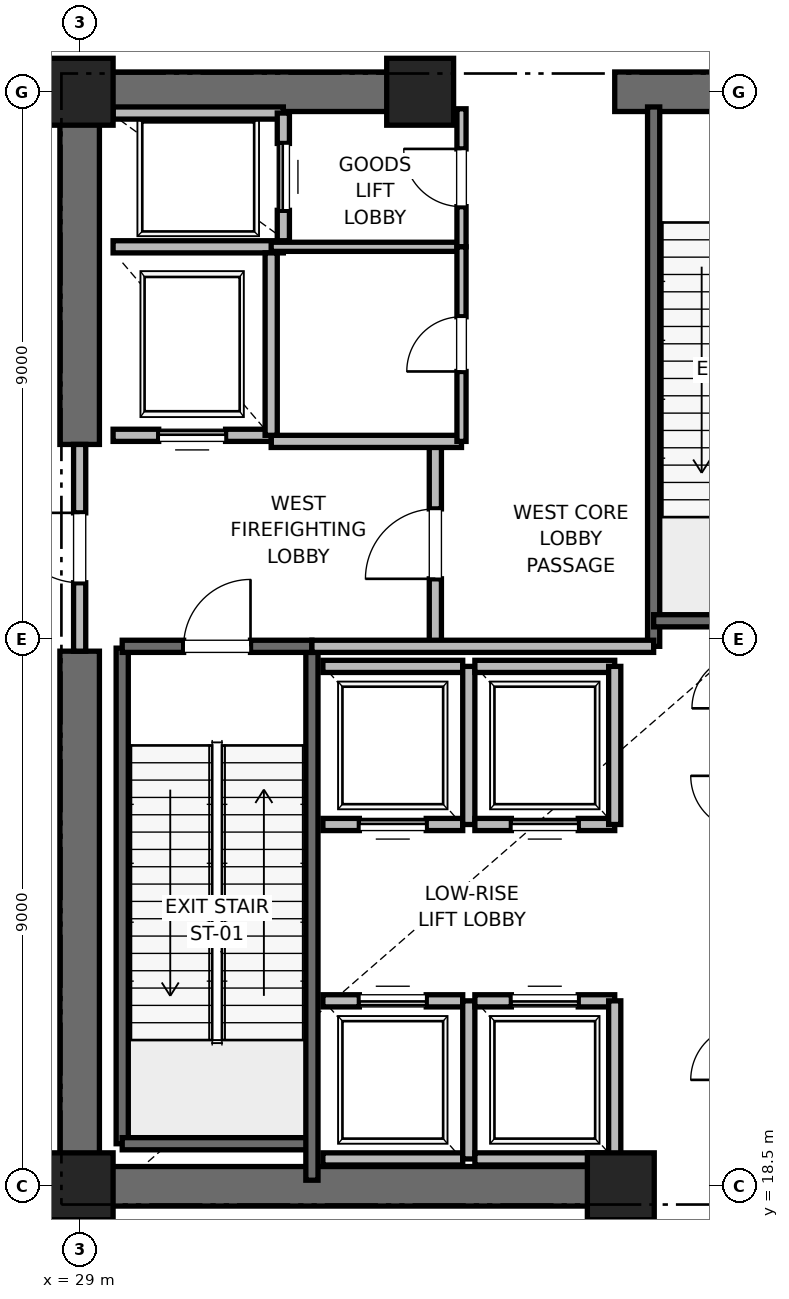
"""IFC4 building model, lengths in metres.
Left out: names, types, materials, properties, quantities, classifications, styles, units other than length and angle.
Written with IfcOpenShell. Run it as: python <this file> out.ifc"""

import sys

from ifc_helpers import new_model, si_unit, direction, frame, frame_2d, origin, origin_2d, place, context, subcontext, project, spatial, rectangle, extrude, element, fill, save


model = new_model("IFC4")
c1 = context("Model", 3, precision=1e-05, world=origin(), true_north=direction((0.0, 1.0)))
c2 = subcontext(c1, "Body", "Model", "MODEL_VIEW")
j1 = project(units=[si_unit("LENGTHUNIT", "METRE"), si_unit("PLANEANGLEUNIT", "RADIAN")], contexts=[c1])
p1 = place(None, origin())
s1 = spatial("IfcSite", under=j1, at=p1, CompositionType="ELEMENT")
p2 = place(p1, origin())
s2 = spatial("IfcBuilding", under=s1, at=p2, CompositionType="ELEMENT")
p3 = place(p2, frame((0.0, 0.0, 21.6)))
s3 = spatial("IfcBuildingStorey", under=s2, at=p3, CompositionType="ELEMENT", Elevation=21.6)
for number, where, z_axis, x_axis in (
    (1, (29.0, 18.5, 0.0), (0.0, 0.0, 1.0), (1.0, 0.0, 0.0)),
    (2, (29.0, 36.5, 0.0), (0.0, 0.0, 1.0), (1.0, 0.0, 0.0)),
    (3, (37.9, 18.5, 0.0), (0.0, 0.0, 1.0), (1.0, 0.0, 0.0)),
    (4, (34.6, 36.5, 0.0), (0.0, 0.0, 1.0), (1.0, 0.0, 0.0)),
):
    element("IfcColumn", number, at=place(p3, frame(where, z_axis=z_axis, x_axis=x_axis)), inside=s3, PredefinedType="PILASTER", context=c2, shape_type="SweptSolid", body=[
        extrude(rectangle(XDim=1.1, YDim=1.1, at=origin_2d()), origin(), (0.0, 0.0, 1.0), 6.0),
    ])
p4 = place(p3, frame((29.0, 18.5, 0.0), z_axis=(0.0, 0.0, 1.0), x_axis=(1.0, 0.0, 0.0)))
e5 = element("IfcWall", 5, at=p4, inside=s3, PredefinedType="SHEAR", context=c2, shape_type="SweptSolid", body=[
    extrude(rectangle(XDim=9.2, YDim=0.65, at=frame_2d((4.6, 0.0))), origin(), (0.0, 0.0, 1.0), 5.76),
])
p5 = place(p3, frame((29.0, 36.5, 0.0), z_axis=(0.0, 0.0, 1.0), x_axis=(1.0, 0.0, 0.0)))
e6 = element("IfcWall", 6, at=p5, inside=s3, PredefinedType="SHEAR", context=c2, shape_type="SweptSolid", body=[
    extrude(rectangle(XDim=5.8, YDim=0.65, at=frame_2d((2.9, 0.0))), origin(), (0.0, 0.0, 1.0), 5.76),
])
p6 = place(p3, frame((37.8, 36.5, 0.0), z_axis=(0.0, 0.0, 1.0), x_axis=(1.0, 0.0, 0.0)))
e7 = element("IfcWall", 7, at=p6, inside=s3, PredefinedType="SHEAR", context=c2, shape_type="SweptSolid", body=[
    extrude(rectangle(XDim=4.4, YDim=0.65, at=frame_2d((2.2, 0.0))), origin(), (0.0, 0.0, 1.0), 5.76),
])
p7 = place(p6, frame((1.65, 0.0, 0.0)))
e8 = element("IfcOpeningElement", 8, at=p7, cuts=e7, PredefinedType="OPENING", context=c2, shape_type="SweptSolid", body=[
    extrude(rectangle(XDim=1.1, YDim=2.15, at=frame_2d((0.55, 1.075))), frame((0.0, 0.325, 0.0), z_axis=(0.0, -1.0, 0.0), x_axis=(1.0, 0.0, 0.0)), (0.0, 0.0, 1.0), 0.65),
])
p8 = place(p3, frame((29.0, 18.5, 0.0), z_axis=(0.0, 0.0, 1.0), x_axis=(0.0, 1.0, 0.0)))
e9 = element("IfcWall", 9, at=p8, inside=s3, PredefinedType="SHEAR", context=c2, shape_type="SweptSolid", body=[
    extrude(rectangle(XDim=8.8, YDim=0.65, at=frame_2d((4.4, 0.0))), origin(), (0.0, 0.0, 1.0), 5.76),
])
p9 = place(p3, frame((29.0, 30.7, 0.0), z_axis=(0.0, 0.0, 1.0), x_axis=(0.0, 1.0, 0.0)))
e10 = element("IfcWall", 10, at=p9, inside=s3, PredefinedType="SHEAR", context=c2, shape_type="SweptSolid", body=[
    extrude(rectangle(XDim=5.8, YDim=0.65, at=frame_2d((2.9, 0.0))), origin(), (0.0, 0.0, 1.0), 5.76),
])
p10 = place(p3, frame((29.7, 19.2, 0.0), z_axis=(0.0, 0.0, 1.0), x_axis=(0.0, 1.0, 0.0)))
e11 = element("IfcWall", 11, at=p10, inside=s3, PredefinedType="SOLIDWALL", context=c2, shape_type="SweptSolid", body=[
    extrude(rectangle(XDim=8.15, YDim=0.2, at=frame_2d((4.075, 0.0))), origin(), (0.0, 0.0, 1.0), 5.76),
])
p11 = place(p3, frame((29.7, 19.2, 0.0), z_axis=(0.0, 0.0, 1.0), x_axis=(1.0, 0.0, 0.0)))
e12 = element("IfcWall", 12, at=p11, inside=s3, PredefinedType="SOLIDWALL", context=c2, shape_type="SweptSolid", body=[
    extrude(rectangle(XDim=3.12, YDim=0.2, at=frame_2d((1.56, 0.0))), origin(), (0.0, 0.0, 1.0), 5.76),
])
p12 = place(p3, frame((32.82, 18.6, 0.0), z_axis=(0.0, 0.0, 1.0), x_axis=(0.0, 1.0, 0.0)))
e13 = element("IfcWall", 13, at=p12, inside=s3, PredefinedType="SOLIDWALL", context=c2, shape_type="SweptSolid", body=[
    extrude(rectangle(XDim=8.78, YDim=0.2, at=frame_2d((4.39, 0.0))), origin(), (0.0, 0.0, 1.0), 5.76),
])
p13 = place(p3, frame((29.7, 27.38, 0.0), z_axis=(0.0, 0.0, 1.0), x_axis=(1.0, 0.0, 0.0)))
e14 = element("IfcWall", 14, at=p13, inside=s3, PredefinedType="SOLIDWALL", context=c2, shape_type="SweptSolid", body=[
    extrude(rectangle(XDim=3.12, YDim=0.2, at=frame_2d((1.56, 0.0))), origin(), (0.0, 0.0, 1.0), 5.76),
])
p14 = place(p13, frame((1.01, 0.0, 0.0)))
e15 = element("IfcOpeningElement", 15, at=p14, cuts=e14, PredefinedType="OPENING", context=c2, shape_type="SweptSolid", body=[
    extrude(rectangle(XDim=1.1, YDim=2.15, at=frame_2d((0.55, 1.075))), frame((0.0, 0.1, 0.0), z_axis=(0.0, -1.0, 0.0), x_axis=(1.0, 0.0, 0.0)), (0.0, 0.0, 1.0), 0.2),
])
p15 = place(p3, frame((38.44, 27.38, 0.0), z_axis=(0.0, 0.0, 1.0), x_axis=(0.0, 1.0, 0.0)))
e16 = element("IfcWall", 16, at=p15, inside=s3, PredefinedType="SOLIDWALL", context=c2, shape_type="SweptSolid", body=[
    extrude(rectangle(XDim=8.87, YDim=0.2, at=frame_2d((4.435, 0.0))), origin(), (0.0, 0.0, 1.0), 5.76),
])
p16 = place(p3, frame((38.44, 27.8, 0.0), z_axis=(0.0, 0.0, 1.0), x_axis=(1.0, 0.0, 0.0)))
e17 = element("IfcWall", 17, at=p16, inside=s3, PredefinedType="SOLIDWALL", context=c2, shape_type="SweptSolid", body=[
    extrude(rectangle(XDim=3.32, YDim=0.2, at=frame_2d((1.66, 0.0))), origin(), (0.0, 0.0, 1.0), 5.76),
])
p17 = place(p3, frame((34.85, 27.38, 0.0), z_axis=(0.0, 0.0, 1.0), x_axis=(0.0, 1.0, 0.0)))
e18 = element("IfcWall", 18, at=p17, inside=s3, PredefinedType="PARTITIONING", context=c2, shape_type="SweptSolid", body=[
    extrude(rectangle(XDim=3.37, YDim=0.2, at=frame_2d((1.685, 0.0))), origin(), (0.0, 0.0, 1.0), 5.76),
])
p18 = place(p17, frame((1.11, 0.0, 0.0)))
e19 = element("IfcOpeningElement", 19, at=p18, cuts=e18, PredefinedType="OPENING", context=c2, shape_type="SweptSolid", body=[
    extrude(rectangle(XDim=1.15, YDim=2.2, at=frame_2d((0.575, 1.1))), frame((0.0, 0.1, 0.0), z_axis=(0.0, -1.0, 0.0), x_axis=(1.0, 0.0, 0.0)), (0.0, 0.0, 1.0), 0.2),
])
p19 = place(p3, frame((29.0, 27.3, 0.0), z_axis=(0.0, 0.0, 1.0), x_axis=(0.0, 1.0, 0.0)))
e20 = element("IfcWall", 20, at=p19, inside=s3, PredefinedType="PARTITIONING", context=c2, shape_type="SweptSolid", body=[
    extrude(rectangle(XDim=3.4, YDim=0.2, at=frame_2d((1.7, 0.0))), origin(), (0.0, 0.0, 1.0), 4.54),
])
p20 = place(p19, frame((1.125, 0.0, 0.0)))
e21 = element("IfcOpeningElement", 21, at=p20, cuts=e20, PredefinedType="OPENING", context=c2, shape_type="SweptSolid", body=[
    extrude(rectangle(XDim=1.15, YDim=2.2, at=frame_2d((0.575, 1.1))), frame((0.0, 0.1, 0.0), z_axis=(0.0, -1.0, 0.0), x_axis=(1.0, 0.0, 0.0)), (0.0, 0.0, 1.0), 0.2),
])
p21 = place(p3, frame((32.82, 27.38, 0.0), z_axis=(0.0, 0.0, 1.0), x_axis=(1.0, 0.0, 0.0)))
e22 = element("IfcWall", 22, at=p21, inside=s3, PredefinedType="PARTITIONING", context=c2, shape_type="SweptSolid", body=[
    extrude(rectangle(XDim=5.62, YDim=0.2, at=frame_2d((2.81, 0.0))), origin(), (0.0, 0.0, 1.0), 5.76),
])
p22 = place(p3, frame((32.15, 30.75, 0.0), z_axis=(0.0, 0.0, 1.0), x_axis=(1.0, 0.0, 0.0)))
e23 = element("IfcWall", 23, at=p22, inside=s3, PredefinedType="PARTITIONING", context=c2, shape_type="SweptSolid", body=[
    extrude(rectangle(XDim=3.13, YDim=0.2, at=frame_2d((1.565, 0.0))), origin(), (0.0, 0.0, 1.0), 5.76),
])
p23 = place(p3, frame((29.55, 30.85, 0.0), z_axis=(0.0, 0.0, 1.0), x_axis=(1.0, 0.0, 0.0)))
e24 = element("IfcWall", 24, at=p23, inside=s3, PredefinedType="SOLIDWALL", context=c2, shape_type="SweptSolid", body=[
    extrude(rectangle(XDim=2.6, YDim=0.2, at=frame_2d((1.3, 0.0))), origin(), (0.0, 0.0, 1.0), 4.54),
])
p24 = place(p23, frame((0.75, 0.0, 0.0)))
e25 = element("IfcOpeningElement", 25, at=p24, cuts=e24, PredefinedType="OPENING", context=c2, shape_type="SweptSolid", body=[
    extrude(rectangle(XDim=1.1, YDim=2.2, at=frame_2d((0.55, 1.1))), frame((0.0, 0.1, 0.0), z_axis=(0.0, -1.0, 0.0), x_axis=(1.0, 0.0, 0.0)), (0.0, 0.0, 1.0), 0.2),
])
p25 = place(p3, frame((29.55, 33.95, 0.0), z_axis=(0.0, 0.0, 1.0), x_axis=(1.0, 0.0, 0.0)))
e26 = element("IfcWall", 26, at=p25, inside=s3, PredefinedType="SOLIDWALL", context=c2, shape_type="SweptSolid", body=[
    extrude(rectangle(XDim=2.8, YDim=0.2, at=frame_2d((1.4, 0.0))), origin(), (0.0, 0.0, 1.0), 5.76),
])
p26 = place(p3, frame((32.15, 30.85, 0.0), z_axis=(0.0, 0.0, 1.0), x_axis=(0.0, 1.0, 0.0)))
e27 = element("IfcWall", 27, at=p26, inside=s3, PredefinedType="SOLIDWALL", context=c2, shape_type="SweptSolid", body=[
    extrude(rectangle(XDim=3.0, YDim=0.2, at=frame_2d((1.5, 0.0))), origin(), (0.0, 0.0, 1.0), 5.76),
])
p27 = place(p3, frame((32.35, 36.15, 0.0), z_axis=(0.0, 0.0, 1.0), x_axis=(-1.0, 0.0, 0.0)))
e28 = element("IfcWall", 28, at=p27, inside=s3, PredefinedType="SOLIDWALL", context=c2, shape_type="SweptSolid", body=[
    extrude(rectangle(XDim=2.8, YDim=0.2, at=frame_2d((1.4, 0.0))), origin(), (0.0, 0.0, 1.0), 4.889),
])
p28 = place(p3, frame((32.35, 34.05, 0.0), z_axis=(0.0, 0.0, 1.0), x_axis=(0.0, 1.0, 0.0)))
e29 = element("IfcWall", 29, at=p28, inside=s3, PredefinedType="SOLIDWALL", context=c2, shape_type="SweptSolid", body=[
    extrude(rectangle(XDim=2.1, YDim=0.2, at=frame_2d((1.05, 0.0))), origin(), (0.0, 0.0, 1.0), 5.76),
])
p29 = place(p28, frame((0.5, 0.0, 0.0)))
e30 = element("IfcOpeningElement", 30, at=p29, cuts=e29, PredefinedType="OPENING", context=c2, shape_type="SweptSolid", body=[
    extrude(rectangle(XDim=1.1, YDim=2.2, at=frame_2d((0.55, 1.1))), frame((0.0, 0.1, 0.0), z_axis=(0.0, -1.0, 0.0), x_axis=(1.0, 0.0, 0.0)), (0.0, 0.0, 1.0), 0.2),
])
p30 = place(p3, frame((33.0, 18.95, 0.0), z_axis=(0.0, 0.0, 1.0), x_axis=(1.0, 0.0, 0.0)))
e31 = element("IfcWall", 31, at=p30, inside=s3, PredefinedType="SOLIDWALL", context=c2, shape_type="SweptSolid", body=[
    extrude(rectangle(XDim=2.3, YDim=0.2, at=frame_2d((1.15, 0.0))), origin(), (0.0, 0.0, 1.0), 5.76),
])
p31 = place(p3, frame((35.3, 21.55, 0.0), z_axis=(0.0, 0.0, 1.0), x_axis=(-1.0, 0.0, 0.0)))
e32 = element("IfcWall", 32, at=p31, inside=s3, PredefinedType="SOLIDWALL", context=c2, shape_type="SweptSolid", body=[
    extrude(rectangle(XDim=2.3, YDim=0.2, at=frame_2d((1.15, 0.0))), origin(), (0.0, 0.0, 1.0), 5.76),
])
p32 = place(p31, frame((0.6, 0.0, 0.0)))
e33 = element("IfcOpeningElement", 33, at=p32, cuts=e32, PredefinedType="OPENING", context=c2, shape_type="SweptSolid", body=[
    extrude(rectangle(XDim=1.1, YDim=2.2, at=frame_2d((0.55, 1.1))), frame((0.0, 0.1, 0.0), z_axis=(0.0, -1.0, 0.0), x_axis=(1.0, 0.0, 0.0)), (0.0, 0.0, 1.0), 0.2),
])
p33 = place(p3, frame((35.4, 18.95, 0.0), z_axis=(0.0, 0.0, 1.0), x_axis=(0.0, 1.0, 0.0)))
e34 = element("IfcWall", 34, at=p33, inside=s3, PredefinedType="SOLIDWALL", context=c2, shape_type="SweptSolid", body=[
    extrude(rectangle(XDim=2.6, YDim=0.2, at=frame_2d((1.3, 0.0))), origin(), (0.0, 0.0, 1.0), 5.76),
])
p34 = place(p3, frame((35.5, 18.95, 0.0), z_axis=(0.0, 0.0, 1.0), x_axis=(1.0, 0.0, 0.0)))
e35 = element("IfcWall", 35, at=p34, inside=s3, PredefinedType="SOLIDWALL", context=c2, shape_type="SweptSolid", body=[
    extrude(rectangle(XDim=2.3, YDim=0.2, at=frame_2d((1.15, 0.0))), origin(), (0.0, 0.0, 1.0), 4.54),
])
p35 = place(p3, frame((37.8, 21.55, 0.0), z_axis=(0.0, 0.0, 1.0), x_axis=(-1.0, 0.0, 0.0)))
e36 = element("IfcWall", 36, at=p35, inside=s3, PredefinedType="SOLIDWALL", context=c2, shape_type="SweptSolid", body=[
    extrude(rectangle(XDim=2.3, YDim=0.2, at=frame_2d((1.15, 0.0))), origin(), (0.0, 0.0, 1.0), 5.76),
])
p36 = place(p35, frame((0.6, 0.0, 0.0)))
e37 = element("IfcOpeningElement", 37, at=p36, cuts=e36, PredefinedType="OPENING", context=c2, shape_type="SweptSolid", body=[
    extrude(rectangle(XDim=1.1, YDim=2.2, at=frame_2d((0.55, 1.1))), frame((0.0, 0.1, 0.0), z_axis=(0.0, -1.0, 0.0), x_axis=(1.0, 0.0, 0.0)), (0.0, 0.0, 1.0), 0.2),
])
p37 = place(p3, frame((37.8, 18.95, 0.0), z_axis=(0.0, 0.0, 1.0), x_axis=(0.0, 1.0, 0.0)))
e38 = element("IfcWall", 38, at=p37, inside=s3, PredefinedType="SOLIDWALL", context=c2, shape_type="SweptSolid", body=[
    extrude(rectangle(XDim=2.6, YDim=0.2, at=frame_2d((1.3, 0.0))), origin(), (0.0, 0.0, 1.0), 4.54),
])
p38 = place(p3, frame((33.0, 24.45, 0.0), z_axis=(0.0, 0.0, 1.0), x_axis=(1.0, 0.0, 0.0)))
e39 = element("IfcWall", 39, at=p38, inside=s3, PredefinedType="SOLIDWALL", context=c2, shape_type="SweptSolid", body=[
    extrude(rectangle(XDim=2.3, YDim=0.2, at=frame_2d((1.15, 0.0))), origin(), (0.0, 0.0, 1.0), 5.76),
])
p39 = place(p38, frame((0.6, 0.0, 0.0)))
e40 = element("IfcOpeningElement", 40, at=p39, cuts=e39, PredefinedType="OPENING", context=c2, shape_type="SweptSolid", body=[
    extrude(rectangle(XDim=1.1, YDim=2.2, at=frame_2d((0.55, 1.1))), frame((0.0, 0.1, 0.0), z_axis=(0.0, -1.0, 0.0), x_axis=(1.0, 0.0, 0.0)), (0.0, 0.0, 1.0), 0.2),
])
p40 = place(p3, frame((35.3, 27.05, 0.0), z_axis=(0.0, 0.0, 1.0), x_axis=(-1.0, 0.0, 0.0)))
e41 = element("IfcWall", 41, at=p40, inside=s3, PredefinedType="SOLIDWALL", context=c2, shape_type="SweptSolid", body=[
    extrude(rectangle(XDim=2.3, YDim=0.2, at=frame_2d((1.15, 0.0))), origin(), (0.0, 0.0, 1.0), 5.76),
])
p41 = place(p3, frame((35.4, 24.45, 0.0), z_axis=(0.0, 0.0, 1.0), x_axis=(0.0, 1.0, 0.0)))
e42 = element("IfcWall", 42, at=p41, inside=s3, PredefinedType="SOLIDWALL", context=c2, shape_type="SweptSolid", body=[
    extrude(rectangle(XDim=2.6, YDim=0.2, at=frame_2d((1.3, 0.0))), origin(), (0.0, 0.0, 1.0), 5.76),
])
p42 = place(p3, frame((35.5, 24.45, 0.0), z_axis=(0.0, 0.0, 1.0), x_axis=(1.0, 0.0, 0.0)))
e43 = element("IfcWall", 43, at=p42, inside=s3, PredefinedType="SOLIDWALL", context=c2, shape_type="SweptSolid", body=[
    extrude(rectangle(XDim=2.3, YDim=0.2, at=frame_2d((1.15, 0.0))), origin(), (0.0, 0.0, 1.0), 5.76),
])
p43 = place(p42, frame((0.6, 0.0, 0.0)))
e44 = element("IfcOpeningElement", 44, at=p43, cuts=e43, PredefinedType="OPENING", context=c2, shape_type="SweptSolid", body=[
    extrude(rectangle(XDim=1.1, YDim=2.2, at=frame_2d((0.55, 1.1))), frame((0.0, 0.1, 0.0), z_axis=(0.0, -1.0, 0.0), x_axis=(1.0, 0.0, 0.0)), (0.0, 0.0, 1.0), 0.2),
])
p44 = place(p3, frame((37.8, 27.05, 0.0), z_axis=(0.0, 0.0, 1.0), x_axis=(-1.0, 0.0, 0.0)))
e45 = element("IfcWall", 45, at=p44, inside=s3, PredefinedType="SOLIDWALL", context=c2, shape_type="SweptSolid", body=[
    extrude(rectangle(XDim=2.3, YDim=0.2, at=frame_2d((1.15, 0.0))), origin(), (0.0, 0.0, 1.0), 5.76),
])
p45 = place(p3, frame((37.8, 24.45, 0.0), z_axis=(0.0, 0.0, 1.0), x_axis=(0.0, 1.0, 0.0)))
e46 = element("IfcWall", 46, at=p45, inside=s3, PredefinedType="SOLIDWALL", context=c2, shape_type="SweptSolid", body=[
    extrude(rectangle(XDim=2.6, YDim=0.2, at=frame_2d((1.3, 0.0))), origin(), (0.0, 0.0, 1.0), 5.76),
])
p46 = place(p3, frame((32.15, 33.95, 0.0), z_axis=(0.0, 0.0, 1.0), x_axis=(1.0, 0.0, 0.0)))
e47 = element("IfcWall", 47, at=p46, inside=s3, PredefinedType="PARTITIONING", context=c2, shape_type="SweptSolid", body=[
    extrude(rectangle(XDim=3.13, YDim=0.15, at=frame_2d((1.565, 0.0))), origin(), (0.0, 0.0, 1.0), 2.85),
])
p47 = place(p3, frame((35.28, 33.95, 0.0), z_axis=(0.0, 0.0, 1.0), x_axis=(0.0, 1.0, 0.0)))
e48 = element("IfcWall", 48, at=p47, inside=s3, PredefinedType="PARTITIONING", context=c2, shape_type="SweptSolid", body=[
    extrude(rectangle(XDim=2.27, YDim=0.15, at=frame_2d((1.135, 0.0))), origin(), (0.0, 0.0, 1.0), 2.85),
])
p48 = place(p47, frame((0.66, 0.0, 0.0)))
e49 = element("IfcOpeningElement", 49, at=p48, cuts=e48, PredefinedType="OPENING", context=c2, shape_type="SweptSolid", body=[
    extrude(rectangle(XDim=0.95, YDim=2.15, at=frame_2d((0.475, 1.075))), frame((0.0, 0.075, 0.0), z_axis=(0.0, -1.0, 0.0), x_axis=(1.0, 0.0, 0.0)), (0.0, 0.0, 1.0), 0.15),
])
p49 = place(p3, frame((35.28, 30.75, 0.0), z_axis=(0.0, 0.0, 1.0), x_axis=(0.0, 1.0, 0.0)))
e50 = element("IfcWall", 50, at=p49, inside=s3, PredefinedType="PARTITIONING", context=c2, shape_type="SweptSolid", body=[
    extrude(rectangle(XDim=3.2, YDim=0.15, at=frame_2d((1.6, 0.0))), origin(), (0.0, 0.0, 1.0), 2.85),
])
p50 = place(p49, frame((1.15, 0.0, 0.0)))
e51 = element("IfcOpeningElement", 51, at=p50, cuts=e50, PredefinedType="OPENING", context=c2, shape_type="SweptSolid", body=[
    extrude(rectangle(XDim=0.9, YDim=2.1, at=frame_2d((0.45, 1.05))), frame((0.0, 0.075, 0.0), z_axis=(0.0, -1.0, 0.0), x_axis=(1.0, 0.0, 0.0)), (0.0, 0.0, 1.0), 0.15),
])
p51 = place(p14, origin())
e52 = element("IfcDoor", 52, at=p51, inside=s3, OperationType="SINGLE_SWING_RIGHT", PredefinedType="DOOR", context=c2, shape_type="SweptSolid", body=[
    extrude(rectangle(XDim=1.1, YDim=2.15, at=frame_2d((0.55, 1.075))), frame((0.0, 0.025, 0.0), z_axis=(0.0, -1.0, 0.0), x_axis=(1.0, 0.0, 0.0)), (0.0, 0.0, 1.0), 0.05),
])
fill(e15, e52)
p52 = place(p18, origin())
e53 = element("IfcDoor", 53, at=p52, inside=s3, OperationType="SINGLE_SWING_LEFT", PredefinedType="DOOR", context=c2, shape_type="SweptSolid", body=[
    extrude(rectangle(XDim=1.15, YDim=2.2, at=frame_2d((0.575, 1.1))), frame((0.0, 0.025, 0.0), z_axis=(0.0, -1.0, 0.0), x_axis=(1.0, 0.0, 0.0)), (0.0, 0.0, 1.0), 0.05),
])
fill(e19, e53)
p53 = place(p20, origin())
e54 = element("IfcDoor", 54, at=p53, inside=s3, OperationType="SINGLE_SWING_RIGHT", PredefinedType="DOOR", context=c2, shape_type="SweptSolid", body=[
    extrude(rectangle(XDim=1.15, YDim=2.2, at=frame_2d((0.575, 1.1))), frame((0.0, 0.025, 0.0), z_axis=(0.0, -1.0, 0.0), x_axis=(1.0, 0.0, 0.0)), (0.0, 0.0, 1.0), 0.05),
])
fill(e21, e54)
p54 = place(p24, origin())
e55 = element("IfcDoor", 55, at=p54, inside=s3, OperationType="SLIDING_TO_RIGHT", PredefinedType="DOOR", context=c2, shape_type="SweptSolid", body=[
    extrude(rectangle(XDim=1.1, YDim=2.2, at=frame_2d((0.55, 1.1))), frame((0.0, 0.025, 0.0), z_axis=(0.0, -1.0, 0.0), x_axis=(1.0, 0.0, 0.0)), (0.0, 0.0, 1.0), 0.05),
])
fill(e25, e55)
p55 = place(p29, origin())
e56 = element("IfcDoor", 56, at=p55, inside=s3, OperationType="SLIDING_TO_RIGHT", PredefinedType="DOOR", context=c2, shape_type="SweptSolid", body=[
    extrude(rectangle(XDim=1.1, YDim=2.2, at=frame_2d((0.55, 1.1))), frame((0.0, 0.025, 0.0), z_axis=(0.0, -1.0, 0.0), x_axis=(1.0, 0.0, 0.0)), (0.0, 0.0, 1.0), 0.05),
])
fill(e30, e56)
p56 = place(p32, origin())
e57 = element("IfcDoor", 57, at=p56, inside=s3, OperationType="SLIDING_TO_RIGHT", PredefinedType="DOOR", context=c2, shape_type="SweptSolid", body=[
    extrude(rectangle(XDim=1.1, YDim=2.2, at=frame_2d((0.55, 1.1))), frame((0.0, 0.025, 0.0), z_axis=(0.0, -1.0, 0.0), x_axis=(1.0, 0.0, 0.0)), (0.0, 0.0, 1.0), 0.05),
])
fill(e33, e57)
p57 = place(p36, origin())
e58 = element("IfcDoor", 58, at=p57, inside=s3, OperationType="SLIDING_TO_RIGHT", PredefinedType="DOOR", context=c2, shape_type="SweptSolid", body=[
    extrude(rectangle(XDim=1.1, YDim=2.2, at=frame_2d((0.55, 1.1))), frame((0.0, 0.025, 0.0), z_axis=(0.0, -1.0, 0.0), x_axis=(1.0, 0.0, 0.0)), (0.0, 0.0, 1.0), 0.05),
])
fill(e37, e58)
p58 = place(p39, origin())
e59 = element("IfcDoor", 59, at=p58, inside=s3, OperationType="SLIDING_TO_RIGHT", PredefinedType="DOOR", context=c2, shape_type="SweptSolid", body=[
    extrude(rectangle(XDim=1.1, YDim=2.2, at=frame_2d((0.55, 1.1))), frame((0.0, 0.025, 0.0), z_axis=(0.0, -1.0, 0.0), x_axis=(1.0, 0.0, 0.0)), (0.0, 0.0, 1.0), 0.05),
])
fill(e40, e59)
p59 = place(p43, origin())
e60 = element("IfcDoor", 60, at=p59, inside=s3, OperationType="SLIDING_TO_RIGHT", PredefinedType="DOOR", context=c2, shape_type="SweptSolid", body=[
    extrude(rectangle(XDim=1.1, YDim=2.2, at=frame_2d((0.55, 1.1))), frame((0.0, 0.025, 0.0), z_axis=(0.0, -1.0, 0.0), x_axis=(1.0, 0.0, 0.0)), (0.0, 0.0, 1.0), 0.05),
])
fill(e44, e60)
p60 = place(p48, origin())
e61 = element("IfcDoor", 61, at=p60, inside=s3, OperationType="SINGLE_SWING_RIGHT", PredefinedType="DOOR", context=c2, shape_type="SweptSolid", body=[
    extrude(rectangle(XDim=0.95, YDim=2.15, at=frame_2d((0.475, 1.075))), frame((0.0, 0.025, 0.0), z_axis=(0.0, -1.0, 0.0), x_axis=(1.0, 0.0, 0.0)), (0.0, 0.0, 1.0), 0.05),
])
fill(e49, e61)
p61 = place(p50, origin())
e62 = element("IfcDoor", 62, at=p61, inside=s3, OperationType="SINGLE_SWING_LEFT", PredefinedType="DOOR", context=c2, shape_type="SweptSolid", body=[
    extrude(rectangle(XDim=0.9, YDim=2.1, at=frame_2d((0.45, 1.05))), frame((0.0, 0.025, 0.0), z_axis=(0.0, -1.0, 0.0), x_axis=(1.0, 0.0, 0.0)), (0.0, 0.0, 1.0), 0.05),
])
fill(e51, e62)
save(model, sys.argv[1])
